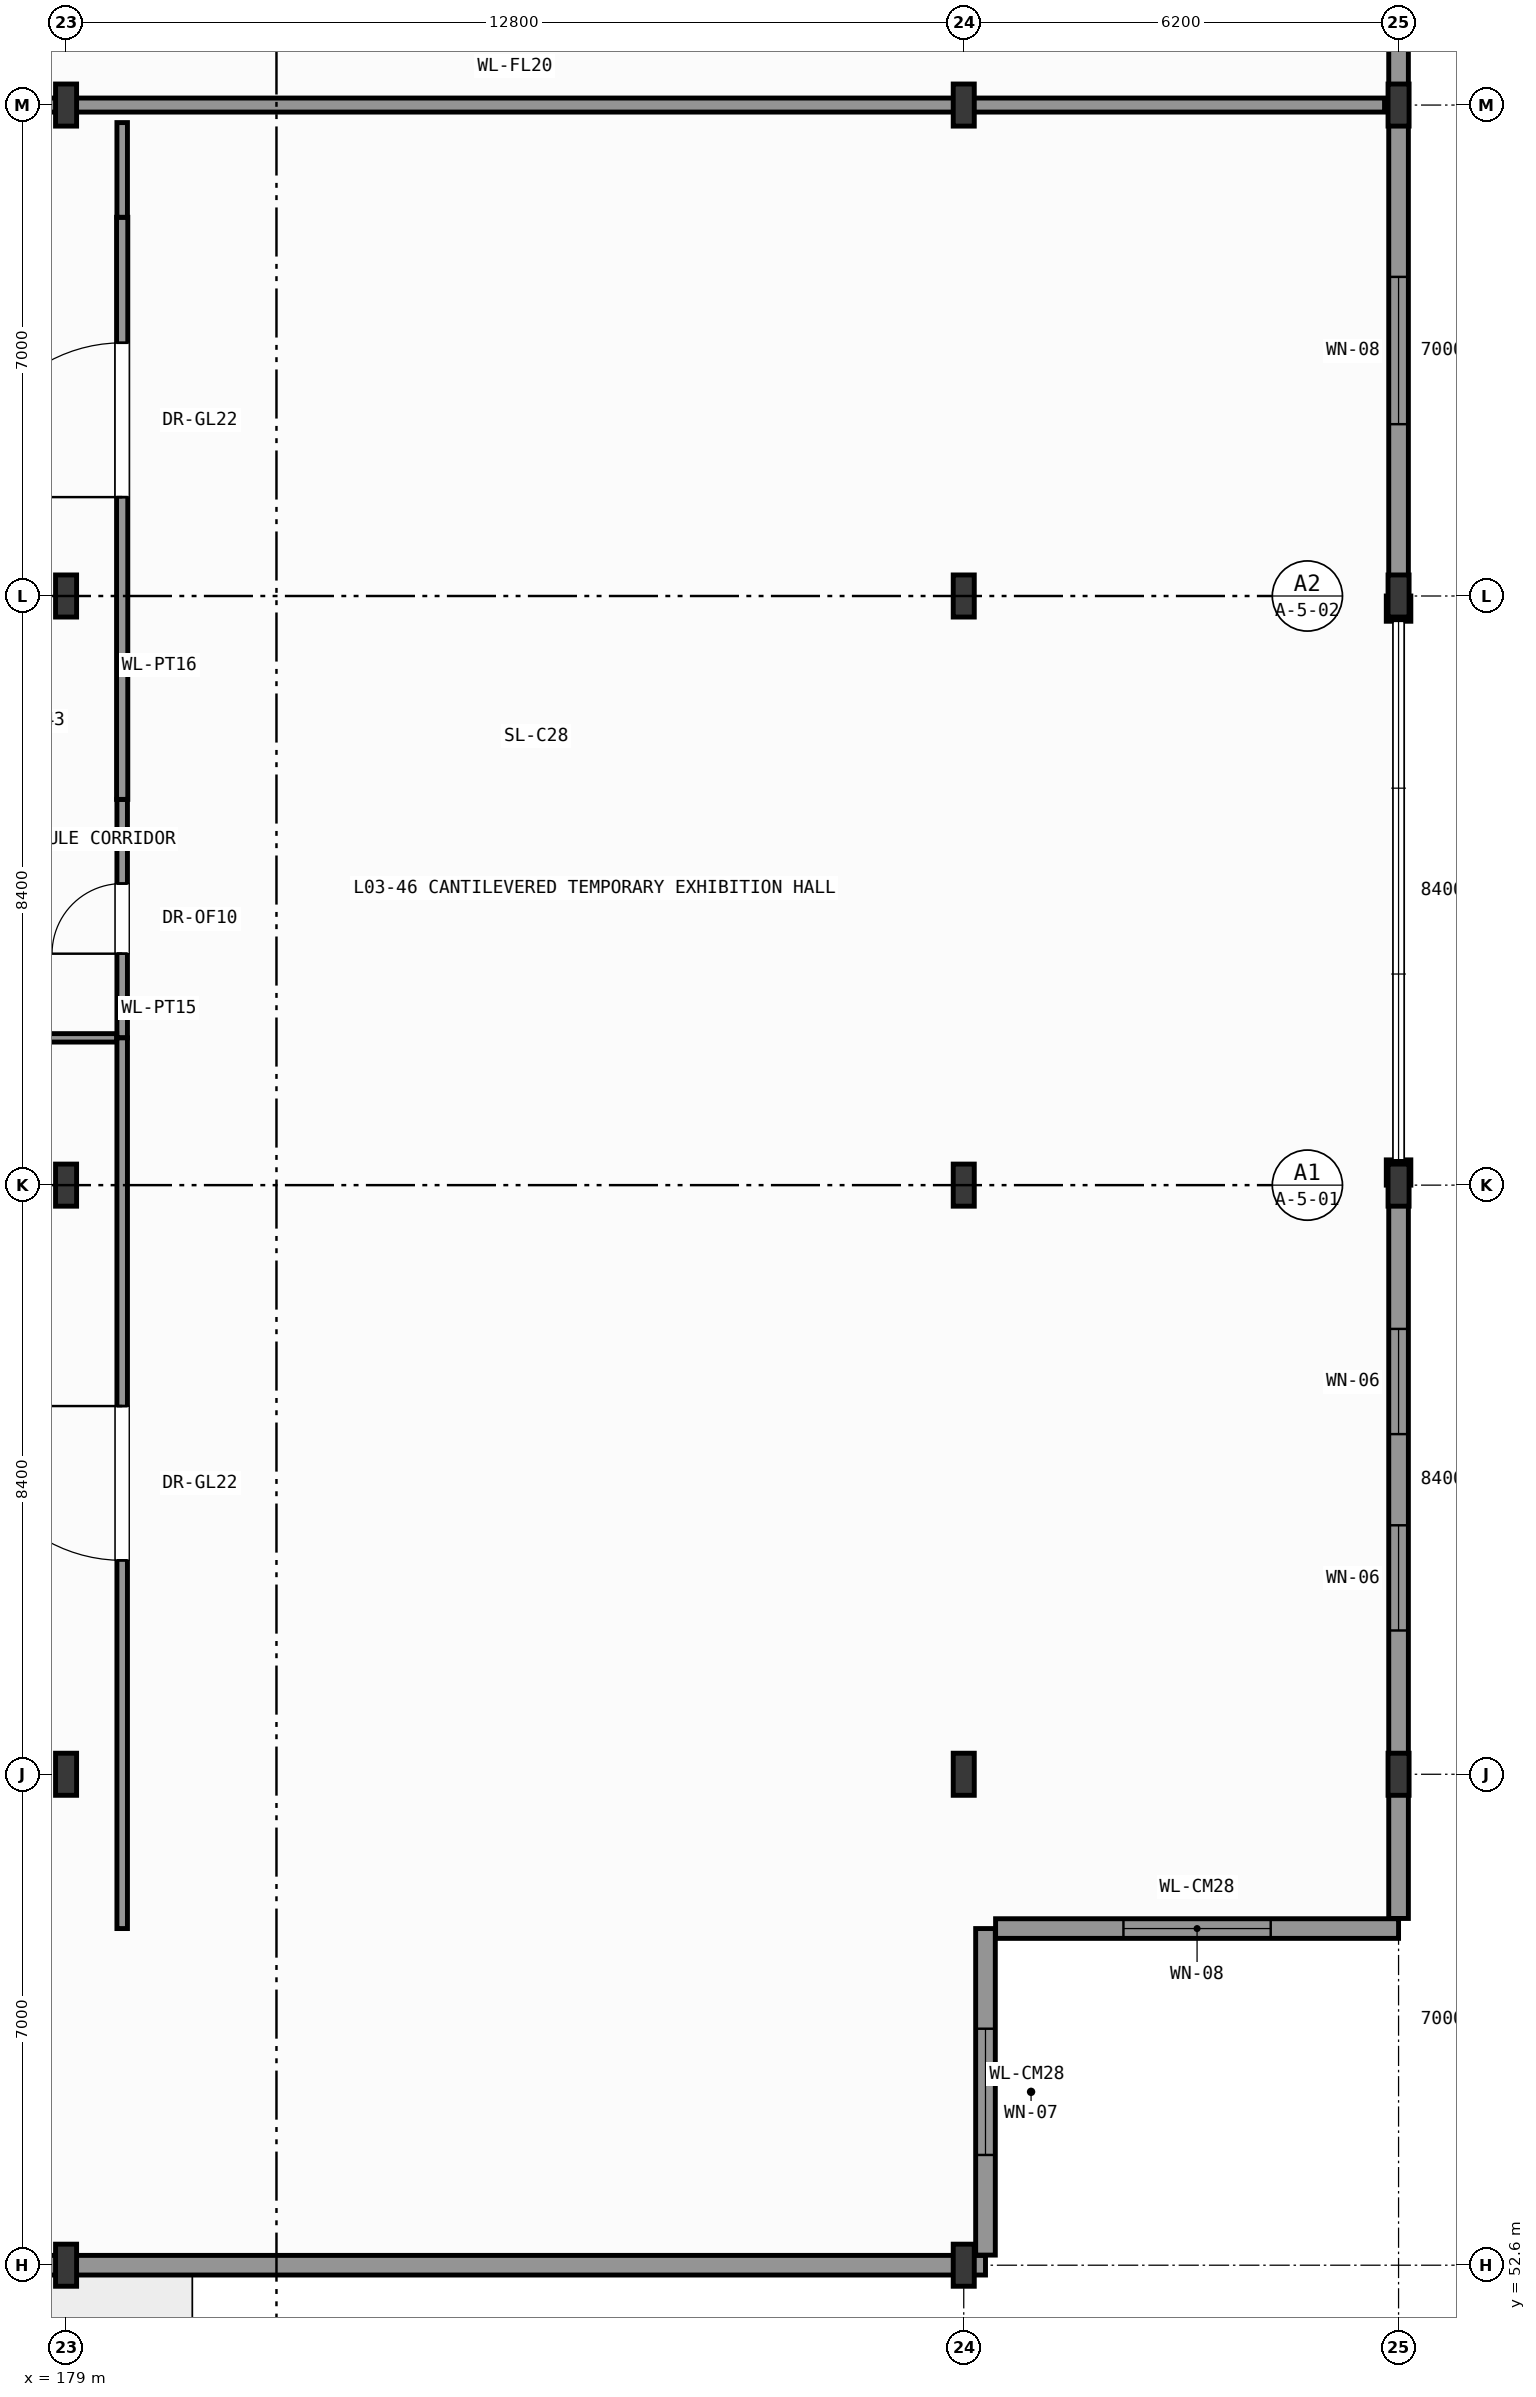
"""IFC4 building model, lengths in metres.
Left out: names, types, materials, properties, quantities, classifications, styles, units other than length and angle.
Written with IfcOpenShell. Run it as: python <this file> out.ifc"""

import sys

from ifc_helpers import new_model, si_unit, direction, frame, frame_2d, origin, origin_2d, place, context, subcontext, project, spatial, rectangle, i_section, extrude, element, fill, save


model = new_model("IFC4")
c1 = context("Model", 3, precision=1e-05, world=origin(), true_north=direction((0.0, 1.0)))
c2 = subcontext(c1, "Body", "Model", "MODEL_VIEW")
j1 = project(units=[si_unit("LENGTHUNIT", "METRE"), si_unit("PLANEANGLEUNIT", "RADIAN")], contexts=[c1])
p1 = place(None, origin())
s1 = spatial("IfcSite", under=j1, at=p1, CompositionType="ELEMENT")
p2 = place(p1, origin())
s2 = spatial("IfcBuilding", under=s1, at=p2, CompositionType="ELEMENT")
p3 = place(p2, frame((0.0, 0.0, 13.2)))
s3 = spatial("IfcBuildingStorey", under=s2, at=p3, CompositionType="ELEMENT", Elevation=13.2)
for number, where, z_axis, x_axis in (
    (1, (179.0, 52.6, 0.0), (0.0, 0.0, 1.0), (1.0, 0.0, 0.0)),
    (2, (179.0, 59.6, 0.0), (0.0, 0.0, 1.0), (1.0, 0.0, 0.0)),
    (3, (179.0, 68.0, 0.0), (0.0, 0.0, 1.0), (1.0, 0.0, 0.0)),
    (4, (179.0, 76.4, 0.0), (0.0, 0.0, 1.0), (1.0, 0.0, 0.0)),
    (5, (179.0, 83.4, 0.0), (0.0, 0.0, 1.0), (1.0, 0.0, 0.0)),
    (6, (191.8, 52.6, 0.0), (0.0, 0.0, 1.0), (1.0, 0.0, 0.0)),
    (7, (191.8, 59.6, 0.0), (0.0, 0.0, 1.0), (1.0, 0.0, 0.0)),
    (8, (191.8, 68.0, 0.0), (0.0, 0.0, 1.0), (1.0, 0.0, 0.0)),
    (9, (191.8, 76.4, 0.0), (0.0, 0.0, 1.0), (1.0, 0.0, 0.0)),
    (10, (191.8, 83.4, 0.0), (0.0, 0.0, 1.0), (1.0, 0.0, 0.0)),
    (11, (198.0, 59.6, 0.0), (0.0, 0.0, 1.0), (1.0, 0.0, 0.0)),
    (12, (198.0, 68.0, 0.0), (0.0, 0.0, 1.0), (1.0, 0.0, 0.0)),
    (13, (198.0, 76.4, 0.0), (0.0, 0.0, 1.0), (1.0, 0.0, 0.0)),
    (14, (198.0, 83.4, 0.0), (0.0, 0.0, 1.0), (1.0, 0.0, 0.0)),
):
    element("IfcColumn", number, at=place(p3, frame(where, z_axis=z_axis, x_axis=x_axis)), inside=s3, PredefinedType="COLUMN", context=c2, shape_type="SweptSolid", body=[
        extrude(i_section(OverallWidth=0.3, OverallDepth=0.6, WebThickness=0.015, FlangeThickness=0.03, FilletRadius=0.027, at=origin_2d()), origin(), (0.0, 0.0, 1.0), 4.8),
    ])
p4 = place(p3, frame((179.0, 52.6, 0.0), z_axis=(0.0, 0.0, 1.0), x_axis=(-1.0, 0.0, 0.0)))
e15 = element("IfcWall", 15, at=p4, inside=s3, PredefinedType="SOLIDWALL", context=c2, shape_type="SweptSolid", body=[
    extrude(rectangle(XDim=11.856, YDim=0.28, at=frame_2d((5.928, 0.0))), origin(), (0.0, 0.0, 1.0), 3.955),
])
p5 = place(p4, frame((2.902, 0.0, 0.95)))
e16 = element("IfcOpeningElement", 16, at=p5, cuts=e15, PredefinedType="OPENING", context=c2, shape_type="SweptSolid", body=[
    extrude(rectangle(XDim=2.1, YDim=2.61, at=frame_2d((1.05, 1.305))), frame((0.0, 0.15, 0.0), z_axis=(0.0, -1.0, 0.0), x_axis=(1.0, 0.0, 0.0)), (0.0, 0.0, 1.0), 0.3),
])
p6 = place(p4, frame((6.854, 0.0, 0.95)))
e17 = element("IfcOpeningElement", 17, at=p6, cuts=e15, PredefinedType="OPENING", context=c2, shape_type="SweptSolid", body=[
    extrude(rectangle(XDim=2.1, YDim=2.61, at=frame_2d((1.05, 1.305))), frame((0.0, 0.15, 0.0), z_axis=(0.0, -1.0, 0.0), x_axis=(1.0, 0.0, 0.0)), (0.0, 0.0, 1.0), 0.3),
])
p7 = place(p3, frame((192.11, 52.6, 0.0), z_axis=(0.0, 0.0, 1.0), x_axis=(-1.0, 0.0, 0.0)))
e18 = element("IfcWall", 18, at=p7, inside=s3, PredefinedType="SOLIDWALL", context=c2, shape_type="SweptSolid", body=[
    extrude(rectangle(XDim=13.11, YDim=0.28, at=frame_2d((6.555, 0.0))), origin(), (0.0, 0.0, 1.0), 3.955),
])
p8 = place(p3, frame((192.11, 57.4, 0.0), z_axis=(0.0, 0.0, 1.0), x_axis=(0.0, -1.0, 0.0)))
e19 = element("IfcWall", 19, at=p8, inside=s3, PredefinedType="SOLIDWALL", context=c2, shape_type="SweptSolid", body=[
    extrude(rectangle(XDim=4.656, YDim=0.28, at=frame_2d((2.328, 0.0))), origin(), (0.0, 0.0, 1.0), 4.215),
])
p9 = place(p8, frame((1.428, 0.0, 0.95)))
e20 = element("IfcOpeningElement", 20, at=p9, cuts=e19, PredefinedType="OPENING", context=c2, shape_type="SweptSolid", body=[
    extrude(rectangle(XDim=1.8, YDim=2.6, at=frame_2d((0.9, 1.3))), frame((0.0, 0.15, 0.0), z_axis=(0.0, -1.0, 0.0), x_axis=(1.0, 0.0, 0.0)), (0.0, 0.0, 1.0), 0.3),
])
p10 = place(p3, frame((198.0, 57.4, 0.0), z_axis=(0.0, 0.0, 1.0), x_axis=(-1.0, 0.0, 0.0)))
e21 = element("IfcWall", 21, at=p10, inside=s3, PredefinedType="SOLIDWALL", context=c2, shape_type="SweptSolid", body=[
    extrude(rectangle(XDim=5.746, YDim=0.28, at=frame_2d((2.873, 0.0))), origin(), (0.0, 0.0, 1.0), 4.56),
])
p11 = place(p10, frame((1.823, 0.0, 0.95)))
e22 = element("IfcOpeningElement", 22, at=p11, cuts=e21, PredefinedType="OPENING", context=c2, shape_type="SweptSolid", body=[
    extrude(rectangle(XDim=2.1, YDim=2.8, at=frame_2d((1.05, 1.4))), frame((0.0, 0.15, 0.0), z_axis=(0.0, -1.0, 0.0), x_axis=(1.0, 0.0, 0.0)), (0.0, 0.0, 1.0), 0.3),
])
p12 = place(p3, frame((198.0, 59.6, 0.0), z_axis=(0.0, 0.0, 1.0), x_axis=(0.0, -1.0, 0.0)))
e23 = element("IfcWall", 23, at=p12, inside=s3, PredefinedType="SOLIDWALL", context=c2, shape_type="SweptSolid", body=[
    extrude(rectangle(XDim=2.056, YDim=0.28, at=frame_2d((1.028, 0.0))), origin(), (0.0, 0.0, 1.0), 4.56),
])
p13 = place(p3, frame((198.0, 68.0, 0.0), z_axis=(0.0, 0.0, 1.0), x_axis=(0.0, -1.0, 0.0)))
e24 = element("IfcWall", 24, at=p13, inside=s3, PredefinedType="SOLIDWALL", context=c2, shape_type="SweptSolid", body=[
    extrude(rectangle(XDim=8.4, YDim=0.28, at=frame_2d((4.2, 0.0))), origin(), (0.0, 0.0, 1.0), 4.065),
])
p14 = place(p13, frame((2.05, 0.0, 0.95)))
e25 = element("IfcOpeningElement", 25, at=p14, cuts=e24, PredefinedType="OPENING", context=c2, shape_type="SweptSolid", body=[
    extrude(rectangle(XDim=1.5, YDim=2.4, at=frame_2d((0.75, 1.2))), frame((0.0, 0.15, 0.0), z_axis=(0.0, -1.0, 0.0), x_axis=(1.0, 0.0, 0.0)), (0.0, 0.0, 1.0), 0.3),
])
p15 = place(p13, frame((4.85, 0.0, 0.95)))
e26 = element("IfcOpeningElement", 26, at=p15, cuts=e24, PredefinedType="OPENING", context=c2, shape_type="SweptSolid", body=[
    extrude(rectangle(XDim=1.5, YDim=2.4, at=frame_2d((0.75, 1.2))), frame((0.0, 0.15, 0.0), z_axis=(0.0, -1.0, 0.0), x_axis=(1.0, 0.0, 0.0)), (0.0, 0.0, 1.0), 0.3),
])
p16 = place(p3, frame((198.0, 68.0, 0.0), z_axis=(0.0, 0.0, 1.0), x_axis=(0.0, 1.0, 0.0)))
e27 = element("IfcWall", 27, at=p16, inside=s3, PredefinedType="SOLIDWALL", context=c2, shape_type="SweptSolid", body=[
    extrude(rectangle(XDim=0.36, YDim=0.35, at=frame_2d((0.18, 0.0))), origin(), (0.0, 0.0, 1.0), 4.065),
])
p17 = place(p3, frame((198.0, 76.04, 0.0), z_axis=(0.0, 0.0, 1.0), x_axis=(0.0, 1.0, 0.0)))
e28 = element("IfcWall", 28, at=p17, inside=s3, PredefinedType="SOLIDWALL", context=c2, shape_type="SweptSolid", body=[
    extrude(rectangle(XDim=0.36, YDim=0.35, at=frame_2d((0.18, 0.0))), origin(), (0.0, 0.0, 1.0), 4.065),
])
p18 = place(p3, frame((198.0, 83.4, 0.0), z_axis=(0.0, 0.0, 1.0), x_axis=(0.0, -1.0, 0.0)))
e29 = element("IfcWall", 29, at=p18, inside=s3, PredefinedType="SOLIDWALL", context=c2, shape_type="SweptSolid", body=[
    extrude(rectangle(XDim=7.0, YDim=0.28, at=frame_2d((3.5, 0.0))), origin(), (0.0, 0.0, 1.0), 4.215),
])
p19 = place(p18, frame((2.45, 0.0, 0.95)))
e30 = element("IfcOpeningElement", 30, at=p19, cuts=e29, PredefinedType="OPENING", context=c2, shape_type="SweptSolid", body=[
    extrude(rectangle(XDim=2.1, YDim=2.8, at=frame_2d((1.05, 1.4))), frame((0.0, 0.15, 0.0), z_axis=(0.0, -1.0, 0.0), x_axis=(1.0, 0.0, 0.0)), (0.0, 0.0, 1.0), 0.3),
])
p20 = place(p3, frame((198.0, 90.4, 0.0), z_axis=(0.0, 0.0, 1.0), x_axis=(0.0, -1.0, 0.0)))
e31 = element("IfcWall", 31, at=p20, inside=s3, PredefinedType="SOLIDWALL", context=c2, shape_type="SweptSolid", body=[
    extrude(rectangle(XDim=7.0, YDim=0.28, at=frame_2d((3.5, 0.0))), origin(), (0.0, 0.0, 1.0), 4.215),
])
p21 = place(p20, frame((1.583, 0.0, 0.95)))
e32 = element("IfcOpeningElement", 32, at=p21, cuts=e31, PredefinedType="OPENING", context=c2, shape_type="SweptSolid", body=[
    extrude(rectangle(XDim=1.5, YDim=2.4, at=frame_2d((0.75, 1.2))), frame((0.0, 0.15, 0.0), z_axis=(0.0, -1.0, 0.0), x_axis=(1.0, 0.0, 0.0)), (0.0, 0.0, 1.0), 0.3),
])
p22 = place(p20, frame((3.917, 0.0, 0.95)))
e33 = element("IfcOpeningElement", 33, at=p22, cuts=e31, PredefinedType="OPENING", context=c2, shape_type="SweptSolid", body=[
    extrude(rectangle(XDim=1.5, YDim=2.4, at=frame_2d((0.75, 1.2))), frame((0.0, 0.15, 0.0), z_axis=(0.0, -1.0, 0.0), x_axis=(1.0, 0.0, 0.0)), (0.0, 0.0, 1.0), 0.3),
])
p23 = place(p3, frame((179.8, 70.1, 0.0), z_axis=(0.0, 0.0, 1.0), x_axis=(0.0, 1.0, 0.0)))
e34 = element("IfcWall", 34, at=p23, inside=s3, PredefinedType="PARTITIONING", context=c2, shape_type="SweptSolid", body=[
    extrude(rectangle(XDim=3.4, YDim=0.15, at=frame_2d((1.7, 0.0))), origin(), (0.0, 0.0, 1.0), 4.56),
])
p24 = place(p23, frame((1.2, 0.0, 0.0)))
e35 = element("IfcOpeningElement", 35, at=p24, cuts=e34, PredefinedType="OPENING", context=c2, shape_type="SweptSolid", body=[
    extrude(rectangle(XDim=1.0, YDim=2.15, at=frame_2d((0.5, 1.075))), frame((0.0, 0.085, 0.0), z_axis=(0.0, -1.0, 0.0), x_axis=(1.0, 0.0, 0.0)), (0.0, 0.0, 1.0), 0.17),
])
p25 = place(p3, frame((170.484, 70.1, 0.0), z_axis=(0.0, 0.0, 1.0), x_axis=(1.0, 0.0, 0.0)))
e36 = element("IfcWall", 36, at=p25, inside=s3, PredefinedType="PARTITIONING", context=c2, shape_type="SweptSolid", body=[
    extrude(rectangle(XDim=9.237, YDim=0.12, at=frame_2d((4.619, 0.0))), origin(), (0.0, 0.0, 1.0), 4.56),
])
p26 = place(p25, frame((3.519, 0.0, 0.0)))
e37 = element("IfcOpeningElement", 37, at=p26, cuts=e36, PredefinedType="OPENING", context=c2, shape_type="SweptSolid", body=[
    extrude(rectangle(XDim=2.2, YDim=2.6, at=frame_2d((1.1, 1.3))), frame((0.0, 0.07, 0.0), z_axis=(0.0, -1.0, 0.0), x_axis=(1.0, 0.0, 0.0)), (0.0, 0.0, 1.0), 0.14),
])
p27 = place(p3, frame((179.8, 73.5, 0.0), z_axis=(0.0, 0.0, 1.0), x_axis=(0.0, 1.0, 0.0)))
e38 = element("IfcWall", 38, at=p27, inside=s3, PredefinedType="PARTITIONING", context=c2, shape_type="SweptSolid", body=[
    extrude(rectangle(XDim=8.3, YDim=0.16, at=frame_2d((4.15, 0.0))), origin(), (0.0, 0.0, 1.0), 4.56),
])
p28 = place(p27, frame((4.31, 0.0, 0.0)))
e39 = element("IfcOpeningElement", 39, at=p28, cuts=e38, PredefinedType="OPENING", context=c2, shape_type="SweptSolid", body=[
    extrude(rectangle(XDim=2.2, YDim=2.6, at=frame_2d((1.1, 1.3))), frame((0.0, 0.09, 0.0), z_axis=(0.0, -1.0, 0.0), x_axis=(1.0, 0.0, 0.0)), (0.0, 0.0, 1.0), 0.18),
])
p29 = place(p3, frame((179.8, 81.8, 0.0), z_axis=(0.0, 0.0, 1.0), x_axis=(0.0, 1.0, 0.0)))
e40 = element("IfcWall", 40, at=p29, inside=s3, PredefinedType="PARTITIONING", context=c2, shape_type="SweptSolid", body=[
    extrude(rectangle(XDim=1.35, YDim=0.15, at=frame_2d((0.675, 0.0))), origin(), (0.0, 0.0, 1.0), 4.56),
])
p30 = place(p3, frame((179.8, 57.4, 0.0), z_axis=(0.0, 0.0, 1.0), x_axis=(0.0, 1.0, 0.0)))
e41 = element("IfcWall", 41, at=p30, inside=s3, PredefinedType="PARTITIONING", context=c2, shape_type="SweptSolid", body=[
    extrude(rectangle(XDim=12.7, YDim=0.15, at=frame_2d((6.35, 0.0))), origin(), (0.0, 0.0, 1.0), 4.56),
])
p31 = place(p30, frame((5.25, 0.0, 0.0)))
e42 = element("IfcOpeningElement", 42, at=p31, cuts=e41, PredefinedType="OPENING", context=c2, shape_type="SweptSolid", body=[
    extrude(rectangle(XDim=2.2, YDim=2.6, at=frame_2d((1.1, 1.3))), frame((0.0, 0.085, 0.0), z_axis=(0.0, -1.0, 0.0), x_axis=(1.0, 0.0, 0.0)), (0.0, 0.0, 1.0), 0.17),
])
p32 = place(p3, frame((170.5, 83.4, 0.0), z_axis=(0.0, 0.0, 1.0), x_axis=(1.0, 0.0, 0.0)))
e43 = element("IfcWall", 43, at=p32, inside=s3, PredefinedType="PARTITIONING", context=c2, shape_type="SweptSolid", body=[
    extrude(rectangle(XDim=27.3, YDim=0.2, at=frame_2d((13.65, 0.0))), origin(), (0.0, 0.0, 1.0), 3.805),
])
p33 = place(p9, origin())
e44 = element("IfcWindow", 44, at=p33, inside=s3, PartitioningType="SINGLE_PANEL", PredefinedType="WINDOW", context=c2, shape_type="SweptSolid", body=[
    extrude(rectangle(XDim=1.8, YDim=2.6, at=frame_2d((0.9, 1.3))), frame((0.0, 0.03, 0.0), z_axis=(0.0, -1.0, 0.0), x_axis=(1.0, 0.0, 0.0)), (0.0, 0.0, 1.0), 0.06),
])
fill(e20, e44)
p34 = place(p11, origin())
e45 = element("IfcWindow", 45, at=p34, inside=s3, PartitioningType="SINGLE_PANEL", PredefinedType="WINDOW", context=c2, shape_type="SweptSolid", body=[
    extrude(rectangle(XDim=2.1, YDim=2.8, at=frame_2d((1.05, 1.4))), frame((0.0, 0.03, 0.0), z_axis=(0.0, -1.0, 0.0), x_axis=(1.0, 0.0, 0.0)), (0.0, 0.0, 1.0), 0.06),
])
fill(e22, e45)
p35 = place(p14, origin())
e46 = element("IfcWindow", 46, at=p35, inside=s3, PartitioningType="SINGLE_PANEL", PredefinedType="WINDOW", context=c2, shape_type="SweptSolid", body=[
    extrude(rectangle(XDim=1.5, YDim=2.4, at=frame_2d((0.75, 1.2))), frame((0.0, 0.03, 0.0), z_axis=(0.0, -1.0, 0.0), x_axis=(1.0, 0.0, 0.0)), (0.0, 0.0, 1.0), 0.06),
])
fill(e25, e46)
p36 = place(p15, origin())
e47 = element("IfcWindow", 47, at=p36, inside=s3, PartitioningType="SINGLE_PANEL", PredefinedType="WINDOW", context=c2, shape_type="SweptSolid", body=[
    extrude(rectangle(XDim=1.5, YDim=2.4, at=frame_2d((0.75, 1.2))), frame((0.0, 0.03, 0.0), z_axis=(0.0, -1.0, 0.0), x_axis=(1.0, 0.0, 0.0)), (0.0, 0.0, 1.0), 0.06),
])
fill(e26, e47)
p37 = place(p19, origin())
e48 = element("IfcWindow", 48, at=p37, inside=s3, PartitioningType="SINGLE_PANEL", PredefinedType="WINDOW", context=c2, shape_type="SweptSolid", body=[
    extrude(rectangle(XDim=2.1, YDim=2.8, at=frame_2d((1.05, 1.4))), frame((0.0, 0.03, 0.0), z_axis=(0.0, -1.0, 0.0), x_axis=(1.0, 0.0, 0.0)), (0.0, 0.0, 1.0), 0.06),
])
fill(e30, e48)
p38 = place(p24, origin())
e49 = element("IfcDoor", 49, at=p38, inside=s3, OperationType="SINGLE_SWING_LEFT", PredefinedType="DOOR", context=c2, shape_type="SweptSolid", body=[
    extrude(rectangle(XDim=1.0, YDim=2.15, at=frame_2d((0.5, 1.075))), frame((0.0, 0.025, 0.0), z_axis=(0.0, -1.0, 0.0), x_axis=(1.0, 0.0, 0.0)), (0.0, 0.0, 1.0), 0.05),
])
fill(e35, e49)
p39 = place(p28, origin())
e50 = element("IfcDoor", 50, at=p39, inside=s3, OperationType="SINGLE_SWING_LEFT", PredefinedType="DOOR", context=c2, shape_type="SweptSolid", body=[
    extrude(rectangle(XDim=2.2, YDim=2.6, at=frame_2d((1.1, 1.3))), frame((0.0, 0.025, 0.0), z_axis=(0.0, -1.0, 0.0), x_axis=(1.0, 0.0, 0.0)), (0.0, 0.0, 1.0), 0.05),
])
fill(e39, e50)
p40 = place(p31, origin())
e51 = element("IfcDoor", 51, at=p40, inside=s3, OperationType="SINGLE_SWING_RIGHT", PredefinedType="DOOR", context=c2, shape_type="SweptSolid", body=[
    extrude(rectangle(XDim=2.2, YDim=2.6, at=frame_2d((1.1, 1.3))), frame((0.0, 0.025, 0.0), z_axis=(0.0, -1.0, 0.0), x_axis=(1.0, 0.0, 0.0)), (0.0, 0.0, 1.0), 0.05),
])
fill(e42, e51)
save(model, sys.argv[1])
